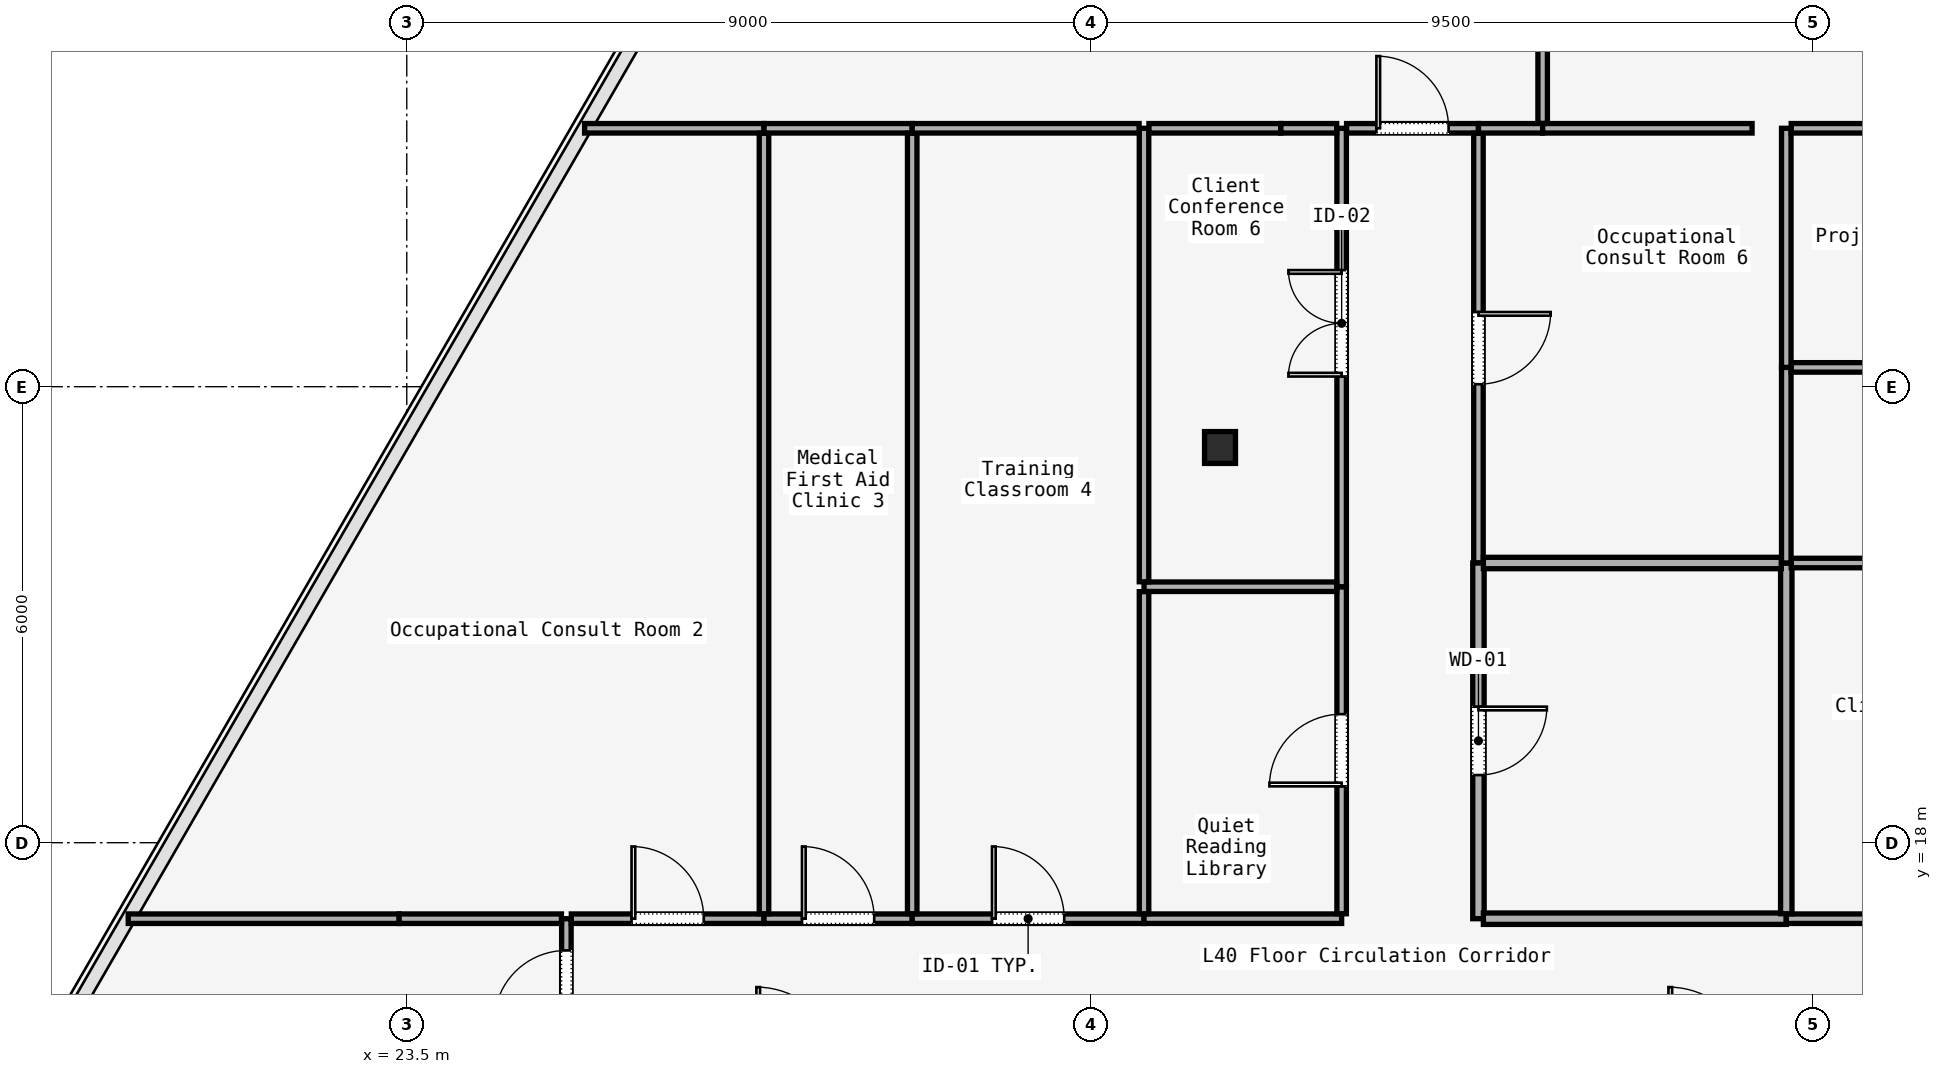
"""IFC4 building model, lengths in metres.
Left out: names, types, materials, properties, quantities, classifications, styles, units other than length and angle.
Written with IfcOpenShell. Run it as: python <this file> out.ifc"""

import sys

from ifc_helpers import new_model, si_unit, direction, frame, frame_2d, origin, origin_2d, place, context, subcontext, project, spatial, rectangle, i_section, extrude, element, fill, save


model = new_model("IFC4")
c1 = context("Model", 3, precision=1e-05, world=origin(), true_north=direction((0.0, 1.0)))
c2 = subcontext(c1, "Body", "Model", "MODEL_VIEW")
j1 = project(units=[si_unit("LENGTHUNIT", "METRE"), si_unit("PLANEANGLEUNIT", "RADIAN")], contexts=[c1])
p1 = place(None, origin())
s1 = spatial("IfcSite", under=j1, at=p1, CompositionType="ELEMENT")
p2 = place(p1, origin())
s2 = spatial("IfcBuilding", under=s1, at=p2, CompositionType="ELEMENT")
p3 = place(p2, frame((0.0, 0.0, 168.8)))
s3 = spatial("IfcBuildingStorey", under=s2, at=p3, CompositionType="ELEMENT", Elevation=168.8)
p4 = place(p3, frame((34.2, 23.2, 0.0), z_axis=(0.0, 0.0, 1.0), x_axis=(1.0, 0.0, 0.0)))
e1 = element("IfcColumn", 1, at=p4, inside=s3, PredefinedType="COLUMN", context=c2, shape_type="SweptSolid", body=[
    extrude(i_section(OverallWidth=0.407, OverallDepth=0.419, WebThickness=0.031, FlangeThickness=0.049, FilletRadius=0.015, at=origin_2d()), origin(), (0.0, 0.0, 1.0), 3.58),
])
p5 = place(p3, frame((25.6, 15.215, 0.0), z_axis=(0.0, 0.0, 1.0), x_axis=(0.0, 1.0, 0.0)))
e2 = element("IfcWall", 2, at=p5, inside=s3, PredefinedType="PARTITIONING", context=c2, shape_type="SweptSolid", body=[
    extrude(rectangle(XDim=1.785, YDim=0.125, at=frame_2d((0.893, 0.0))), origin(), (0.0, 0.0, 1.0), 3.01),
])
p6 = place(p5, frame((0.417, 0.0, 0.0)))
e3 = element("IfcOpeningElement", 3, at=p6, cuts=e2, PredefinedType="OPENING", context=c2, shape_type="SweptSolid", body=[
    extrude(rectangle(XDim=0.95, YDim=2.2, at=frame_2d((0.475, 1.1))), frame((0.0, 0.062, 0.0), z_axis=(0.0, -1.0, 0.0), x_axis=(1.0, 0.0, 0.0)), (0.0, 0.0, 1.0), 0.125),
])
p7 = place(p3, frame((25.665, 17.0, 0.0), z_axis=(0.0, 0.0, 1.0), x_axis=(1.0, 0.0, 0.0)))
e4 = element("IfcWall", 4, at=p7, inside=s3, PredefinedType="PARTITIONING", context=c2, shape_type="SweptSolid", body=[
    extrude(rectangle(XDim=2.535, YDim=0.125, at=frame_2d((1.268, 0.0))), origin(), (0.0, 0.0, 1.0), 3.01),
])
p8 = place(p7, frame((0.792, 0.0, 0.0)))
e5 = element("IfcOpeningElement", 5, at=p8, cuts=e4, PredefinedType="OPENING", context=c2, shape_type="SweptSolid", body=[
    extrude(rectangle(XDim=0.95, YDim=2.2, at=frame_2d((0.475, 1.1))), frame((0.0, 0.062, 0.0), z_axis=(0.0, -1.0, 0.0), x_axis=(1.0, 0.0, 0.0)), (0.0, 0.0, 1.0), 0.125),
])
p9 = place(p3, frame((28.2, 17.0, 0.0), z_axis=(0.0, 0.0, 1.0), x_axis=(1.0, 0.0, 0.0)))
e6 = element("IfcWall", 6, at=p9, inside=s3, PredefinedType="PARTITIONING", context=c2, shape_type="SweptSolid", body=[
    extrude(rectangle(XDim=1.95, YDim=0.125, at=frame_2d((0.975, 0.0))), origin(), (0.0, 0.0, 1.0), 3.01),
])
p10 = place(p9, frame((0.5, 0.0, 0.0)))
e7 = element("IfcOpeningElement", 7, at=p10, cuts=e6, PredefinedType="OPENING", context=c2, shape_type="SweptSolid", body=[
    extrude(rectangle(XDim=0.95, YDim=2.2, at=frame_2d((0.475, 1.1))), frame((0.0, 0.062, 0.0), z_axis=(0.0, -1.0, 0.0), x_axis=(1.0, 0.0, 0.0)), (0.0, 0.0, 1.0), 0.125),
])
p11 = place(p3, frame((30.15, 17.0, 0.0), z_axis=(0.0, 0.0, 1.0), x_axis=(1.0, 0.0, 0.0)))
e8 = element("IfcWall", 8, at=p11, inside=s3, PredefinedType="PARTITIONING", context=c2, shape_type="SweptSolid", body=[
    extrude(rectangle(XDim=3.05, YDim=0.125, at=frame_2d((1.525, 0.0))), origin(), (0.0, 0.0, 1.0), 3.01),
])
p12 = place(p11, frame((1.05, 0.0, 0.0)))
e9 = element("IfcOpeningElement", 9, at=p12, cuts=e8, PredefinedType="OPENING", context=c2, shape_type="SweptSolid", body=[
    extrude(rectangle(XDim=0.95, YDim=2.2, at=frame_2d((0.475, 1.1))), frame((0.0, 0.062, 0.0), z_axis=(0.0, -1.0, 0.0), x_axis=(1.0, 0.0, 0.0)), (0.0, 0.0, 1.0), 0.125),
])
p13 = place(p3, frame((33.2, 17.0, 0.0), z_axis=(0.0, 0.0, 1.0), x_axis=(1.0, 0.0, 0.0)))
e10 = element("IfcWall", 10, at=p13, inside=s3, PredefinedType="PARTITIONING", context=c2, shape_type="SweptSolid", body=[
    extrude(rectangle(XDim=2.6, YDim=0.125, at=frame_2d((1.3, 0.0))), origin(), (0.0, 0.0, 1.0), 3.01),
])
p14 = place(p3, frame((35.8, 17.065, 0.0), z_axis=(0.0, 0.0, 1.0), x_axis=(0.0, 1.0, 0.0)))
e11 = element("IfcWall", 11, at=p14, inside=s3, PredefinedType="PARTITIONING", context=c2, shape_type="SweptSolid", body=[
    extrude(rectangle(XDim=4.303, YDim=0.125, at=frame_2d((2.151, 0.0))), origin(), (0.0, 0.0, 1.0), 3.01),
])
p15 = place(p14, frame((1.677, 0.0, 0.0)))
e12 = element("IfcOpeningElement", 12, at=p15, cuts=e11, PredefinedType="OPENING", context=c2, shape_type="SweptSolid", body=[
    extrude(rectangle(XDim=0.95, YDim=2.2, at=frame_2d((0.475, 1.1))), frame((0.0, 0.062, 0.0), z_axis=(0.0, -1.0, 0.0), x_axis=(1.0, 0.0, 0.0)), (0.0, 0.0, 1.0), 0.125),
])
p16 = place(p3, frame((35.8, 21.368, 0.0), z_axis=(0.0, 0.0, 1.0), x_axis=(0.0, 1.0, 0.0)))
e13 = element("IfcWall", 13, at=p16, inside=s3, PredefinedType="PARTITIONING", context=c2, shape_type="SweptSolid", body=[
    extrude(rectangle(XDim=6.032, YDim=0.125, at=frame_2d((3.016, 0.0))), origin(), (0.0, 0.0, 1.0), 3.01),
])
p17 = place(p16, frame((2.766, 0.0, 0.0)))
e14 = element("IfcOpeningElement", 14, at=p17, cuts=e13, PredefinedType="OPENING", context=c2, shape_type="SweptSolid", body=[
    extrude(rectangle(XDim=1.4, YDim=2.2, at=frame_2d((0.7, 1.1))), frame((0.0, 0.062, 0.0), z_axis=(0.0, -1.0, 0.0), x_axis=(1.0, 0.0, 0.0)), (0.0, 0.0, 1.0), 0.125),
])
p18 = place(p3, frame((35.865, 27.4, 0.0), z_axis=(0.0, 0.0, 1.0), x_axis=(1.0, 0.0, 0.0)))
e15 = element("IfcWall", 15, at=p18, inside=s3, PredefinedType="PARTITIONING", context=c2, shape_type="SweptSolid", body=[
    extrude(rectangle(XDim=1.735, YDim=0.125, at=frame_2d((0.868, 0.0))), origin(), (0.0, 0.0, 1.0), 3.01),
])
p19 = place(p18, frame((0.393, 0.0, 0.0)))
e16 = element("IfcOpeningElement", 16, at=p19, cuts=e15, PredefinedType="OPENING", context=c2, shape_type="SweptSolid", body=[
    extrude(rectangle(XDim=0.95, YDim=2.2, at=frame_2d((0.475, 1.1))), frame((0.0, 0.062, 0.0), z_axis=(0.0, -1.0, 0.0), x_axis=(1.0, 0.0, 0.0)), (0.0, 0.0, 1.0), 0.125),
])
p20 = place(p3, frame((37.6, 27.335, 0.0), z_axis=(0.0, 0.0, 1.0), x_axis=(0.0, -1.0, 0.0)))
e17 = element("IfcWall", 17, at=p20, inside=s3, PredefinedType="PARTITIONING", context=c2, shape_type="SweptSolid", body=[
    extrude(rectangle(XDim=5.655, YDim=0.125, at=frame_2d((2.828, 0.0))), origin(), (0.0, 0.0, 1.0), 3.01),
])
p21 = place(p20, frame((2.353, 0.0, 0.0)))
e18 = element("IfcOpeningElement", 18, at=p21, cuts=e17, PredefinedType="OPENING", context=c2, shape_type="SweptSolid", body=[
    extrude(rectangle(XDim=0.95, YDim=2.2, at=frame_2d((0.475, 1.1))), frame((0.0, 0.062, 0.0), z_axis=(0.0, -1.0, 0.0), x_axis=(1.0, 0.0, 0.0)), (0.0, 0.0, 1.0), 0.125),
])
p22 = place(p3, frame((37.6, 21.68, 0.0), z_axis=(0.0, 0.0, 1.0), x_axis=(0.0, -1.0, 0.0)))
e19 = element("IfcWall", 19, at=p22, inside=s3, PredefinedType="PARTITIONING", context=c2, shape_type="SweptSolid", body=[
    extrude(rectangle(XDim=4.68, YDim=0.15, at=frame_2d((2.34, 0.0))), origin(), (0.0, 0.0, 1.0), 3.01),
])
p23 = place(p22, frame((1.89, 0.0, 0.0)))
e20 = element("IfcOpeningElement", 20, at=p23, cuts=e19, PredefinedType="OPENING", context=c2, shape_type="SweptSolid", body=[
    extrude(rectangle(XDim=0.9, YDim=2.15, at=frame_2d((0.45, 1.075))), frame((0.0, 0.075, 0.0), z_axis=(0.0, -1.0, 0.0), x_axis=(1.0, 0.0, 0.0)), (0.0, 0.0, 1.0), 0.15),
])
p24 = place(p3, frame((37.665, 17.0, 0.0), z_axis=(0.0, 0.0, 1.0), x_axis=(1.0, 0.0, 0.0)))
e21 = element("IfcWall", 21, at=p24, inside=s3, PredefinedType="PARTITIONING", context=c2, shape_type="SweptSolid", body=[
    extrude(rectangle(XDim=3.985, YDim=0.15, at=frame_2d((1.992, 0.0))), origin(), (0.0, 0.0, 1.0), 3.01),
])
p25 = place(p3, frame((41.65, 17.0, 0.0), z_axis=(0.0, 0.0, 1.0), x_axis=(1.0, 0.0, 0.0)))
e22 = element("IfcWall", 22, at=p25, inside=s3, PredefinedType="PARTITIONING", context=c2, shape_type="SweptSolid", body=[
    extrude(rectangle(XDim=4.95, YDim=0.125, at=frame_2d((2.475, 0.0))), origin(), (0.0, 0.0, 1.0), 3.01),
])
p26 = place(p25, frame((1.775, 0.0, 0.0)))
e23 = element("IfcOpeningElement", 23, at=p26, cuts=e22, PredefinedType="OPENING", context=c2, shape_type="SweptSolid", body=[
    extrude(rectangle(XDim=1.4, YDim=2.2, at=frame_2d((0.7, 1.1))), frame((0.0, 0.062, 0.0), z_axis=(0.0, -1.0, 0.0), x_axis=(1.0, 0.0, 0.0)), (0.0, 0.0, 1.0), 0.125),
])
p27 = place(p3, frame((19.835, 17.0, 0.0), z_axis=(0.0, 0.0, 1.0), x_axis=(1.0, 0.0, 0.0)))
e24 = element("IfcWall", 24, at=p27, inside=s3, PredefinedType="PARTITIONING", context=c2, shape_type="SweptSolid", body=[
    extrude(rectangle(XDim=3.564, YDim=0.125, at=frame_2d((1.782, 0.0))), origin(), (0.0, 0.0, 1.0), 3.01),
])
p28 = place(p3, frame((23.4, 17.0, 0.0), z_axis=(0.0, 0.0, 1.0), x_axis=(1.0, 0.0, 0.0)))
e25 = element("IfcWall", 25, at=p28, inside=s3, PredefinedType="PARTITIONING", context=c2, shape_type="SweptSolid", body=[
    extrude(rectangle(XDim=2.135, YDim=0.125, at=frame_2d((1.067, 0.0))), origin(), (0.0, 0.0, 1.0), 3.01),
])
p29 = place(p3, frame((33.2, 21.368, 0.0), z_axis=(0.0, 0.0, 1.0), x_axis=(1.0, 0.0, 0.0)))
e26 = element("IfcWall", 26, at=p29, inside=s3, PredefinedType="PARTITIONING", context=c2, shape_type="SweptSolid", body=[
    extrude(rectangle(XDim=2.535, YDim=0.125, at=frame_2d((1.268, 0.0))), origin(), (0.0, 0.0, 1.0), 3.01),
])
p30 = place(p3, frame((33.2, 17.065, 0.0), z_axis=(0.0, 0.0, 1.0), x_axis=(0.0, 1.0, 0.0)))
e27 = element("IfcWall", 27, at=p30, inside=s3, PredefinedType="PARTITIONING", context=c2, shape_type="SweptSolid", body=[
    extrude(rectangle(XDim=4.238, YDim=0.125, at=frame_2d((2.119, 0.0))), origin(), (0.0, 0.0, 1.0), 3.01),
])
p31 = place(p3, frame((41.65, 21.68, 0.0), z_axis=(0.0, 0.0, 1.0), x_axis=(0.0, -1.0, 0.0)))
e28 = element("IfcWall", 28, at=p31, inside=s3, PredefinedType="PARTITIONING", context=c2, shape_type="SweptSolid", body=[
    extrude(rectangle(XDim=4.615, YDim=0.15, at=frame_2d((2.308, 0.0))), origin(), (0.0, 0.0, 1.0), 3.01),
])
p32 = place(p3, frame((37.665, 21.68, 0.0), z_axis=(0.0, 0.0, 1.0), x_axis=(1.0, 0.0, 0.0)))
e29 = element("IfcWall", 29, at=p32, inside=s3, PredefinedType="PARTITIONING", context=c2, shape_type="SweptSolid", body=[
    extrude(rectangle(XDim=3.92, YDim=0.15, at=frame_2d((1.96, 0.0))), origin(), (0.0, 0.0, 1.0), 3.01),
])
p33 = place(p3, frame((41.715, 21.68, 0.0), z_axis=(0.0, 0.0, 1.0), x_axis=(1.0, 0.0, 0.0)))
e30 = element("IfcWall", 30, at=p33, inside=s3, PredefinedType="PARTITIONING", context=c2, shape_type="SweptSolid", body=[
    extrude(rectangle(XDim=4.82, YDim=0.125, at=frame_2d((2.41, 0.0))), origin(), (0.0, 0.0, 1.0), 3.01),
])
p34 = place(p3, frame((25.84, 27.4, 0.0), z_axis=(0.0, 0.0, 1.0), x_axis=(1.0, 0.0, 0.0)))
e31 = element("IfcWall", 31, at=p34, inside=s3, PredefinedType="PARTITIONING", context=c2, shape_type="SweptSolid", body=[
    extrude(rectangle(XDim=2.36, YDim=0.125, at=frame_2d((1.18, 0.0))), origin(), (0.0, 0.0, 1.0), 3.01),
])
p35 = place(p3, frame((28.2, 27.335, 0.0), z_axis=(0.0, 0.0, 1.0), x_axis=(0.0, -1.0, 0.0)))
e32 = element("IfcWall", 32, at=p35, inside=s3, PredefinedType="PARTITIONING", context=c2, shape_type="SweptSolid", body=[
    extrude(rectangle(XDim=10.27, YDim=0.125, at=frame_2d((5.135, 0.0))), origin(), (0.0, 0.0, 1.0), 3.01),
])
p36 = place(p3, frame((28.2, 27.4, 0.0), z_axis=(0.0, 0.0, 1.0), x_axis=(1.0, 0.0, 0.0)))
e33 = element("IfcWall", 33, at=p36, inside=s3, PredefinedType="PARTITIONING", context=c2, shape_type="SweptSolid", body=[
    extrude(rectangle(XDim=1.95, YDim=0.125, at=frame_2d((0.975, 0.0))), origin(), (0.0, 0.0, 1.0), 3.01),
])
p37 = place(p3, frame((30.15, 27.335, 0.0), z_axis=(0.0, 0.0, 1.0), x_axis=(0.0, -1.0, 0.0)))
e34 = element("IfcWall", 34, at=p37, inside=s3, PredefinedType="PARTITIONING", context=c2, shape_type="SweptSolid", body=[
    extrude(rectangle(XDim=10.27, YDim=0.125, at=frame_2d((5.135, 0.0))), origin(), (0.0, 0.0, 1.0), 3.01),
])
p38 = place(p3, frame((33.2, 27.4, 0.0), z_axis=(0.0, 0.0, 1.0), x_axis=(0.0, -1.0, 0.0)))
e35 = element("IfcWall", 35, at=p38, inside=s3, PredefinedType="PARTITIONING", context=c2, shape_type="SweptSolid", body=[
    extrude(rectangle(XDim=5.967, YDim=0.125, at=frame_2d((2.983, 0.0))), origin(), (0.0, 0.0, 1.0), 3.01),
])
p39 = place(p3, frame((30.15, 27.4, 0.0), z_axis=(0.0, 0.0, 1.0), x_axis=(1.0, 0.0, 0.0)))
e36 = element("IfcWall", 36, at=p39, inside=s3, PredefinedType="PARTITIONING", context=c2, shape_type="SweptSolid", body=[
    extrude(rectangle(XDim=2.985, YDim=0.125, at=frame_2d((1.493, 0.0))), origin(), (0.0, 0.0, 1.0), 3.01),
])
p40 = place(p3, frame((41.65, 21.68, 0.0), z_axis=(0.0, 0.0, 1.0), x_axis=(0.0, 1.0, 0.0)))
e37 = element("IfcWall", 37, at=p40, inside=s3, PredefinedType="PARTITIONING", context=c2, shape_type="SweptSolid", body=[
    extrude(rectangle(XDim=2.574, YDim=0.125, at=frame_2d((1.287, 0.0))), origin(), (0.0, 0.0, 1.0), 3.01),
])
p41 = place(p3, frame((41.715, 24.254, 0.0), z_axis=(0.0, 0.0, 1.0), x_axis=(1.0, 0.0, 0.0)))
e38 = element("IfcWall", 38, at=p41, inside=s3, PredefinedType="PARTITIONING", context=c2, shape_type="SweptSolid", body=[
    extrude(rectangle(XDim=4.82, YDim=0.125, at=frame_2d((2.41, 0.0))), origin(), (0.0, 0.0, 1.0), 3.01),
])
p42 = place(p3, frame((33.265, 27.4, 0.0), z_axis=(0.0, 0.0, 1.0), x_axis=(1.0, 0.0, 0.0)))
e39 = element("IfcWall", 39, at=p42, inside=s3, PredefinedType="PARTITIONING", context=c2, shape_type="SweptSolid", body=[
    extrude(rectangle(XDim=1.735, YDim=0.125, at=frame_2d((0.868, 0.0))), origin(), (0.0, 0.0, 1.0), 3.01),
])
p43 = place(p3, frame((35.0, 27.4, 0.0), z_axis=(0.0, 0.0, 1.0), x_axis=(1.0, 0.0, 0.0)))
e40 = element("IfcWall", 40, at=p43, inside=s3, PredefinedType="PARTITIONING", context=c2, shape_type="SweptSolid", body=[
    extrude(rectangle(XDim=0.735, YDim=0.125, at=frame_2d((0.368, 0.0))), origin(), (0.0, 0.0, 1.0), 3.01),
])
p44 = place(p3, frame((41.65, 27.4, 0.0), z_axis=(0.0, 0.0, 1.0), x_axis=(0.0, -1.0, 0.0)))
e41 = element("IfcWall", 41, at=p44, inside=s3, PredefinedType="PARTITIONING", context=c2, shape_type="SweptSolid", body=[
    extrude(rectangle(XDim=3.146, YDim=0.125, at=frame_2d((1.573, 0.0))), origin(), (0.0, 0.0, 1.0), 3.01),
])
p45 = place(p3, frame((37.6, 27.4, 0.0), z_axis=(0.0, 0.0, 1.0), x_axis=(1.0, 0.0, 0.0)))
e42 = element("IfcWall", 42, at=p45, inside=s3, PredefinedType="PARTITIONING", context=c2, shape_type="SweptSolid", body=[
    extrude(rectangle(XDim=0.845, YDim=0.125, at=frame_2d((0.422, 0.0))), origin(), (0.0, 0.0, 1.0), 3.01),
])
p46 = place(p3, frame((38.445, 27.4, 0.0), z_axis=(0.0, 0.0, 1.0), x_axis=(1.0, 0.0, 0.0)))
e43 = element("IfcWall", 43, at=p46, inside=s3, PredefinedType="PARTITIONING", context=c2, shape_type="SweptSolid", body=[
    extrude(rectangle(XDim=2.755, YDim=0.125, at=frame_2d((1.377, 0.0))), origin(), (0.0, 0.0, 1.0), 3.01),
])
p47 = place(p3, frame((41.715, 27.4, 0.0), z_axis=(0.0, 0.0, 1.0), x_axis=(1.0, 0.0, 0.0)))
e44 = element("IfcWall", 44, at=p47, inside=s3, PredefinedType="PARTITIONING", context=c2, shape_type="SweptSolid", body=[
    extrude(rectangle(XDim=4.82, YDim=0.125, at=frame_2d((2.41, 0.0))), origin(), (0.0, 0.0, 1.0), 3.01),
])
p48 = place(p3, frame((38.445, 46.202, 0.0), z_axis=(0.0, 0.0, 1.0), x_axis=(0.0, -1.0, 0.0)))
e45 = element("IfcWall", 45, at=p48, inside=s3, PredefinedType="PARTITIONING", context=c2, shape_type="SweptSolid", body=[
    extrude(rectangle(XDim=18.737, YDim=0.125, at=frame_2d((9.368, 0.0))), origin(), (0.0, 0.0, 1.0), 3.01),
])
p49 = place(p6, origin())
e46 = element("IfcDoor", 46, at=p49, inside=s3, OperationType="SINGLE_SWING_LEFT", PredefinedType="DOOR", context=c2, shape_type="SweptSolid", body=[
    extrude(rectangle(XDim=0.95, YDim=2.2, at=frame_2d((0.475, 1.1))), frame((0.0, 0.025, 0.0), z_axis=(0.0, -1.0, 0.0), x_axis=(1.0, 0.0, 0.0)), (0.0, 0.0, 1.0), 0.05),
])
fill(e3, e46)
p50 = place(p15, origin())
e47 = element("IfcDoor", 47, at=p50, inside=s3, OperationType="SINGLE_SWING_RIGHT", PredefinedType="DOOR", context=c2, shape_type="SweptSolid", body=[
    extrude(rectangle(XDim=0.95, YDim=2.2, at=frame_2d((0.475, 1.1))), frame((0.0, 0.025, 0.0), z_axis=(0.0, -1.0, 0.0), x_axis=(1.0, 0.0, 0.0)), (0.0, 0.0, 1.0), 0.05),
])
fill(e12, e47)
p51 = place(p23, origin())
e48 = element("IfcDoor", 48, at=p51, inside=s3, OperationType="SINGLE_SWING_LEFT", PredefinedType="DOOR", context=c2, shape_type="SweptSolid", body=[
    extrude(rectangle(XDim=0.9, YDim=2.15, at=frame_2d((0.45, 1.075))), frame((0.0, 0.025, 0.0), z_axis=(0.0, -1.0, 0.0), x_axis=(1.0, 0.0, 0.0)), (0.0, 0.0, 1.0), 0.05),
])
fill(e20, e48)
p52 = place(p8, origin())
e49 = element("IfcDoor", 49, at=p52, inside=s3, OperationType="SINGLE_SWING_RIGHT", PredefinedType="DOOR", context=c2, shape_type="SweptSolid", body=[
    extrude(rectangle(XDim=0.95, YDim=2.2, at=frame_2d((0.475, 1.1))), frame((0.0, 0.025, 0.0), z_axis=(0.0, -1.0, 0.0), x_axis=(1.0, 0.0, 0.0)), (0.0, 0.0, 1.0), 0.05),
])
fill(e5, e49)
p53 = place(p10, origin())
e50 = element("IfcDoor", 50, at=p53, inside=s3, OperationType="SINGLE_SWING_LEFT", PredefinedType="DOOR", context=c2, shape_type="SweptSolid", body=[
    extrude(rectangle(XDim=0.95, YDim=2.2, at=frame_2d((0.475, 1.1))), frame((0.0, 0.025, 0.0), z_axis=(0.0, -1.0, 0.0), x_axis=(1.0, 0.0, 0.0)), (0.0, 0.0, 1.0), 0.05),
])
fill(e7, e50)
p54 = place(p12, origin())
e51 = element("IfcDoor", 51, at=p54, inside=s3, OperationType="SINGLE_SWING_RIGHT", PredefinedType="DOOR", context=c2, shape_type="SweptSolid", body=[
    extrude(rectangle(XDim=0.95, YDim=2.2, at=frame_2d((0.475, 1.1))), frame((0.0, 0.025, 0.0), z_axis=(0.0, -1.0, 0.0), x_axis=(1.0, 0.0, 0.0)), (0.0, 0.0, 1.0), 0.05),
])
fill(e9, e51)
p55 = place(p17, origin())
e52 = element("IfcDoor", 52, at=p55, inside=s3, OperationType="SINGLE_SWING_LEFT", PredefinedType="DOOR", context=c2, shape_type="SweptSolid", body=[
    extrude(rectangle(XDim=1.4, YDim=2.2, at=frame_2d((0.7, 1.1))), frame((0.0, 0.025, 0.0), z_axis=(0.0, -1.0, 0.0), x_axis=(1.0, 0.0, 0.0)), (0.0, 0.0, 1.0), 0.05),
])
fill(e14, e52)
p56 = place(p21, origin())
e53 = element("IfcDoor", 53, at=p56, inside=s3, OperationType="SINGLE_SWING_RIGHT", PredefinedType="DOOR", context=c2, shape_type="SweptSolid", body=[
    extrude(rectangle(XDim=0.95, YDim=2.2, at=frame_2d((0.475, 1.1))), frame((0.0, 0.025, 0.0), z_axis=(0.0, -1.0, 0.0), x_axis=(1.0, 0.0, 0.0)), (0.0, 0.0, 1.0), 0.05),
])
fill(e18, e53)
p57 = place(p19, origin())
e54 = element("IfcDoor", 54, at=p57, inside=s3, OperationType="SINGLE_SWING_RIGHT", PredefinedType="DOOR", context=c2, shape_type="SweptSolid", body=[
    extrude(rectangle(XDim=0.95, YDim=2.2, at=frame_2d((0.475, 1.1))), frame((0.0, 0.025, 0.0), z_axis=(0.0, -1.0, 0.0), x_axis=(1.0, 0.0, 0.0)), (0.0, 0.0, 1.0), 0.05),
])
fill(e16, e54)
save(model, sys.argv[1])
